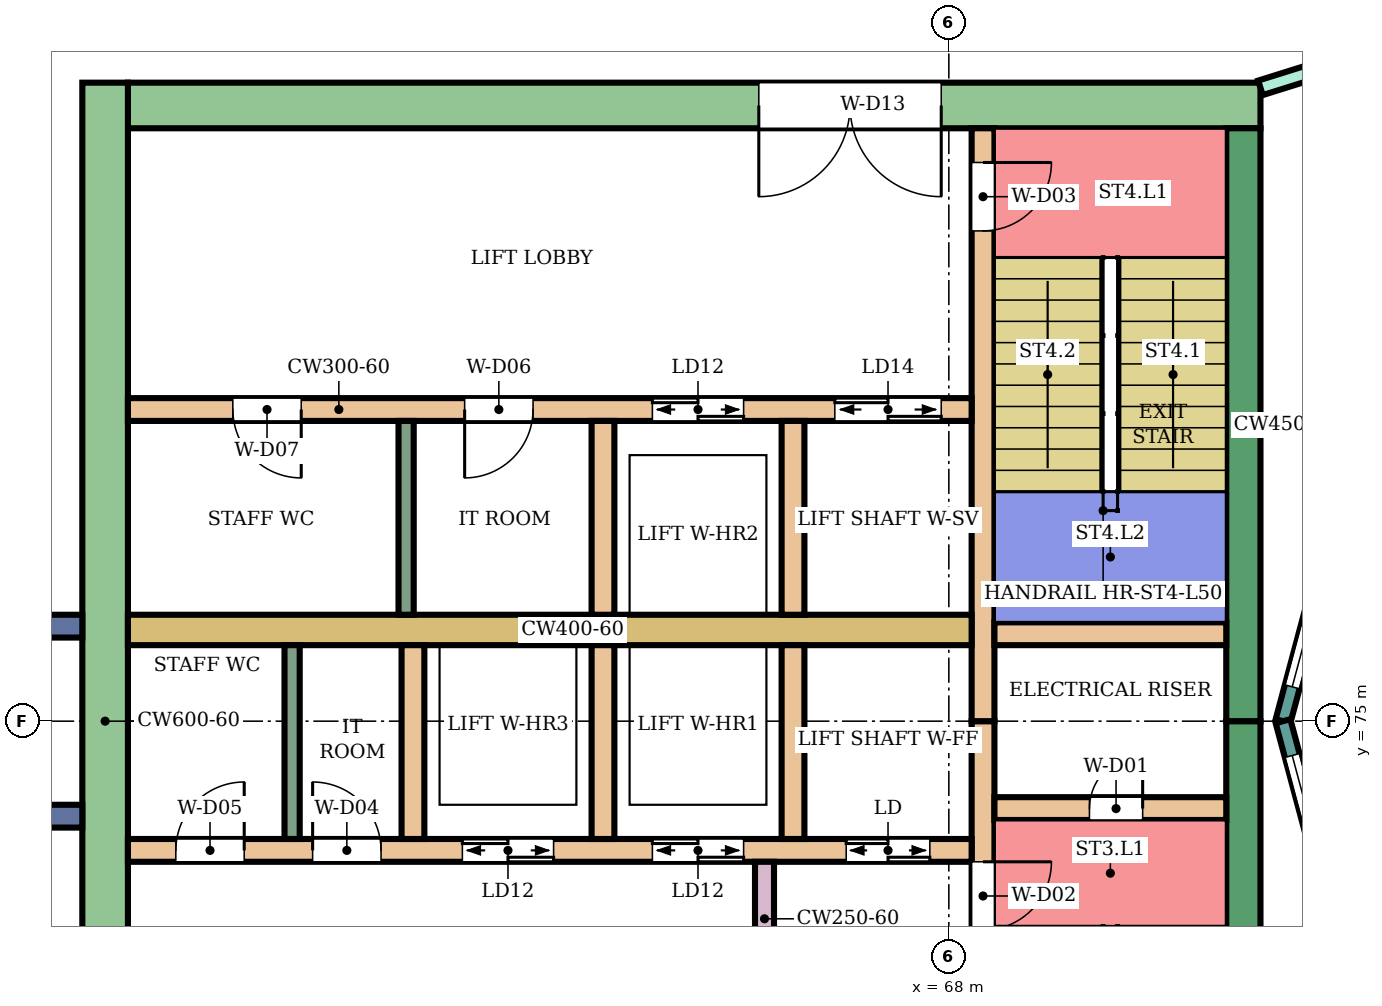
"""IFC4 building model, lengths in metres.
Left out: names, types, materials, properties, quantities, classifications, styles, units other than length and angle.
Written with IfcOpenShell. Run it as: python <this file> out.ifc"""

import sys

from ifc_helpers import new_model, si_unit, direction, frame, frame_2d, origin, place, context, subcontext, project, spatial, rectangle, extrude, element, fill, save


model = new_model("IFC4")
c1 = context("Model", 3, precision=1e-05, world=origin(), true_north=direction((0.0, 1.0)))
c2 = subcontext(c1, "Body", "Model", "MODEL_VIEW")
j1 = project(units=[si_unit("LENGTHUNIT", "METRE"), si_unit("PLANEANGLEUNIT", "RADIAN")], contexts=[c1])
p1 = place(None, origin())
s1 = spatial("IfcSite", under=j1, at=p1, CompositionType="ELEMENT")
p2 = place(p1, origin())
s2 = spatial("IfcBuilding", under=s1, at=p2, CompositionType="ELEMENT")
p3 = place(p2, frame((0.0, 0.0, 216.7)))
s3 = spatial("IfcBuildingStorey", under=s2, at=p3, CompositionType="ELEMENT", Elevation=216.7)
p4 = place(p3, frame((72.1, 83.1, 0.0), z_axis=(0.0, 0.0, 1.0), x_axis=(-1.0, 0.0, 0.0)))
e1 = element("IfcWall", 1, at=p4, inside=s3, PredefinedType="SHEAR", context=c2, shape_type="SweptSolid", body=[
    extrude(rectangle(XDim=14.9, YDim=0.6, at=frame_2d((7.45, 0.0))), origin(), (0.0, 0.0, 1.0), 3.88),
])
p5 = place(p4, frame((4.2, 0.0, 0.0)))
e2 = element("IfcOpeningElement", 2, at=p5, cuts=e1, PredefinedType="OPENING", context=c2, shape_type="SweptSolid", body=[
    extrude(rectangle(XDim=2.4, YDim=2.4, at=frame_2d((1.2, 1.2))), frame((0.0, 0.31, 0.0), z_axis=(0.0, -1.0, 0.0), x_axis=(1.0, 0.0, 0.0)), (0.0, 0.0, 1.0), 0.62),
])
for number, where, z_axis, x_axis in (
    (3, (71.875, 75.0, 0.0), (0.0, 0.0, 1.0), (0.0, -1.0, 0.0)),
    (4, (71.875, 82.8, 0.0), (0.0, 0.0, 1.0), (0.0, -1.0, 0.0)),
):
    element("IfcWall", number, at=place(p3, frame(where, z_axis=z_axis, x_axis=x_axis)), inside=s3, PredefinedType="SHEAR", context=c2, shape_type="SweptSolid", body=[
        extrude(rectangle(XDim=7.8, YDim=0.45, at=frame_2d((3.9, 0.0))), origin(), (0.0, 0.0, 1.0), 3.88),
    ])
p6 = place(p3, frame((56.9, 83.4, 0.0), z_axis=(0.0, 0.0, 1.0), x_axis=(0.0, -1.0, 0.0)))
e5 = element("IfcWall", 5, at=p6, inside=s3, PredefinedType="SHEAR", context=c2, shape_type="SweptSolid", body=[
    extrude(rectangle(XDim=16.8, YDim=0.6, at=frame_2d((8.4, 0.0))), origin(), (0.0, 0.0, 1.0), 3.88),
])
p7 = place(p3, frame((68.45, 75.0, 0.0), z_axis=(0.0, 0.0, 1.0), x_axis=(0.0, -1.0, 0.0)))
e6 = element("IfcWall", 6, at=p7, inside=s3, PredefinedType="SHEAR", context=c2, shape_type="SweptSolid", body=[
    extrude(rectangle(XDim=7.8, YDim=0.3, at=frame_2d((3.9, 0.0))), origin(), (0.0, 0.0, 1.0), 3.88),
])
p8 = place(p7, frame((1.85, 0.0, 0.0)))
e7 = element("IfcOpeningElement", 7, at=p8, cuts=e6, PredefinedType="OPENING", context=c2, shape_type="SweptSolid", body=[
    extrude(rectangle(XDim=0.9, YDim=2.1, at=frame_2d((0.45, 1.05))), frame((0.0, 0.16, 0.0), z_axis=(0.0, -1.0, 0.0), x_axis=(1.0, 0.0, 0.0)), (0.0, 0.0, 1.0), 0.32),
])
p9 = place(p3, frame((68.45, 82.8, 0.0), z_axis=(0.0, 0.0, 1.0), x_axis=(0.0, -1.0, 0.0)))
e8 = element("IfcWall", 8, at=p9, inside=s3, PredefinedType="SHEAR", context=c2, shape_type="SweptSolid", body=[
    extrude(rectangle(XDim=7.8, YDim=0.3, at=frame_2d((3.9, 0.0))), origin(), (0.0, 0.0, 1.0), 3.88),
])
p10 = place(p9, frame((0.45, 0.0, 0.0)))
e9 = element("IfcOpeningElement", 9, at=p10, cuts=e8, PredefinedType="OPENING", context=c2, shape_type="SweptSolid", body=[
    extrude(rectangle(XDim=0.9, YDim=2.1, at=frame_2d((0.45, 1.05))), frame((0.0, 0.16, 0.0), z_axis=(0.0, -1.0, 0.0), x_axis=(1.0, 0.0, 0.0)), (0.0, 0.0, 1.0), 0.32),
])
p11 = place(p3, frame((71.65, 73.85, 0.0), z_axis=(0.0, 0.0, 1.0), x_axis=(-1.0, 0.0, 0.0)))
e10 = element("IfcWall", 10, at=p11, inside=s3, PredefinedType="SHEAR", context=c2, shape_type="SweptSolid", body=[
    extrude(rectangle(XDim=3.05, YDim=0.3, at=frame_2d((1.525, 0.0))), origin(), (0.0, 0.0, 1.0), 3.88),
])
p12 = place(p11, frame((1.1, 0.0, 0.0)))
e11 = element("IfcOpeningElement", 11, at=p12, cuts=e10, PredefinedType="OPENING", context=c2, shape_type="SweptSolid", body=[
    extrude(rectangle(XDim=0.7, YDim=2.0, at=frame_2d((0.35, 1.0))), frame((0.0, 0.16, 0.0), z_axis=(0.0, -1.0, 0.0), x_axis=(1.0, 0.0, 0.0)), (0.0, 0.0, 1.0), 0.32),
])
p13 = place(p3, frame((71.65, 76.15, 0.0), z_axis=(0.0, 0.0, 1.0), x_axis=(-1.0, 0.0, 0.0)))
e12 = element("IfcWall", 12, at=p13, inside=s3, PredefinedType="SHEAR", context=c2, shape_type="SweptSolid", body=[
    extrude(rectangle(XDim=3.05, YDim=0.3, at=frame_2d((1.525, 0.0))), origin(), (0.0, 0.0, 1.0), 3.88),
])
p14 = place(p3, frame((68.3, 73.3, 0.0), z_axis=(0.0, 0.0, 1.0), x_axis=(-1.0, 0.0, 0.0)))
e13 = element("IfcWall", 13, at=p14, inside=s3, PredefinedType="SHEAR", context=c2, shape_type="SweptSolid", body=[
    extrude(rectangle(XDim=11.1, YDim=0.3, at=frame_2d((5.55, 0.0))), origin(), (0.0, 0.0, 1.0), 3.88),
])
p15 = place(p14, frame((0.55, 0.0, 0.0)))
e14 = element("IfcOpeningElement", 14, at=p15, cuts=e13, PredefinedType="OPENING", context=c2, shape_type="SweptSolid", body=[
    extrude(rectangle(XDim=1.1, YDim=2.1, at=frame_2d((0.55, 1.05))), frame((0.0, 0.16, 0.0), z_axis=(0.0, -1.0, 0.0), x_axis=(1.0, 0.0, 0.0)), (0.0, 0.0, 1.0), 0.32),
])
p16 = place(p14, frame((3.0, 0.0, 0.0)))
e15 = element("IfcOpeningElement", 15, at=p16, cuts=e13, PredefinedType="OPENING", context=c2, shape_type="SweptSolid", body=[
    extrude(rectangle(XDim=1.2, YDim=2.1, at=frame_2d((0.6, 1.05))), frame((0.0, 0.16, 0.0), z_axis=(0.0, -1.0, 0.0), x_axis=(1.0, 0.0, 0.0)), (0.0, 0.0, 1.0), 0.32),
])
p17 = place(p14, frame((5.5, 0.0, 0.0)))
e16 = element("IfcOpeningElement", 16, at=p17, cuts=e13, PredefinedType="OPENING", context=c2, shape_type="SweptSolid", body=[
    extrude(rectangle(XDim=1.2, YDim=2.1, at=frame_2d((0.6, 1.05))), frame((0.0, 0.16, 0.0), z_axis=(0.0, -1.0, 0.0), x_axis=(1.0, 0.0, 0.0)), (0.0, 0.0, 1.0), 0.32),
])
p18 = place(p14, frame((7.77, 0.0, 0.0)))
e17 = element("IfcOpeningElement", 17, at=p18, cuts=e13, PredefinedType="OPENING", context=c2, shape_type="SweptSolid", body=[
    extrude(rectangle(XDim=0.9, YDim=2.1, at=frame_2d((0.45, 1.05))), frame((0.0, 0.16, 0.0), z_axis=(0.0, -1.0, 0.0), x_axis=(1.0, 0.0, 0.0)), (0.0, 0.0, 1.0), 0.32),
])
p19 = place(p14, frame((9.57, 0.0, 0.0)))
e18 = element("IfcOpeningElement", 18, at=p19, cuts=e13, PredefinedType="OPENING", context=c2, shape_type="SweptSolid", body=[
    extrude(rectangle(XDim=0.9, YDim=2.1, at=frame_2d((0.45, 1.05))), frame((0.0, 0.16, 0.0), z_axis=(0.0, -1.0, 0.0), x_axis=(1.0, 0.0, 0.0)), (0.0, 0.0, 1.0), 0.32),
])
p20 = place(p3, frame((68.3, 76.2, 0.0), z_axis=(0.0, 0.0, 1.0), x_axis=(-1.0, 0.0, 0.0)))
e19 = element("IfcWall", 19, at=p20, inside=s3, PredefinedType="SHEAR", context=c2, shape_type="SweptSolid", body=[
    extrude(rectangle(XDim=11.1, YDim=0.4, at=frame_2d((5.55, 0.0))), origin(), (0.0, 0.0, 1.0), 3.88),
])
p21 = place(p3, frame((68.3, 79.1, 0.0), z_axis=(0.0, 0.0, 1.0), x_axis=(-1.0, 0.0, 0.0)))
e20 = element("IfcWall", 20, at=p21, inside=s3, PredefinedType="SHEAR", context=c2, shape_type="SweptSolid", body=[
    extrude(rectangle(XDim=11.1, YDim=0.3, at=frame_2d((5.55, 0.0))), origin(), (0.0, 0.0, 1.0), 3.88),
])
p22 = place(p21, frame((0.4, 0.0, 0.0)))
e21 = element("IfcOpeningElement", 21, at=p22, cuts=e20, PredefinedType="OPENING", context=c2, shape_type="SweptSolid", body=[
    extrude(rectangle(XDim=1.4, YDim=2.1, at=frame_2d((0.7, 1.05))), frame((0.0, 0.16, 0.0), z_axis=(0.0, -1.0, 0.0), x_axis=(1.0, 0.0, 0.0)), (0.0, 0.0, 1.0), 0.32),
])
p23 = place(p21, frame((3.0, 0.0, 0.0)))
e22 = element("IfcOpeningElement", 22, at=p23, cuts=e20, PredefinedType="OPENING", context=c2, shape_type="SweptSolid", body=[
    extrude(rectangle(XDim=1.2, YDim=2.1, at=frame_2d((0.6, 1.05))), frame((0.0, 0.16, 0.0), z_axis=(0.0, -1.0, 0.0), x_axis=(1.0, 0.0, 0.0)), (0.0, 0.0, 1.0), 0.32),
])
p24 = place(p21, frame((5.77, 0.0, 0.0)))
e23 = element("IfcOpeningElement", 23, at=p24, cuts=e20, PredefinedType="OPENING", context=c2, shape_type="SweptSolid", body=[
    extrude(rectangle(XDim=0.9, YDim=2.1, at=frame_2d((0.45, 1.05))), frame((0.0, 0.16, 0.0), z_axis=(0.0, -1.0, 0.0), x_axis=(1.0, 0.0, 0.0)), (0.0, 0.0, 1.0), 0.32),
])
p25 = place(p21, frame((8.82, 0.0, 0.0)))
e24 = element("IfcOpeningElement", 24, at=p25, cuts=e20, PredefinedType="OPENING", context=c2, shape_type="SweptSolid", body=[
    extrude(rectangle(XDim=0.9, YDim=2.1, at=frame_2d((0.45, 1.05))), frame((0.0, 0.16, 0.0), z_axis=(0.0, -1.0, 0.0), x_axis=(1.0, 0.0, 0.0)), (0.0, 0.0, 1.0), 0.32),
])
for number, where, z_axis, x_axis in (
    (25, (65.95, 76.0, 0.0), (0.0, 0.0, 1.0), (0.0, -1.0, 0.0)),
    (26, (63.45, 76.0, 0.0), (0.0, 0.0, 1.0), (0.0, -1.0, 0.0)),
    (27, (60.95, 76.0, 0.0), (0.0, 0.0, 1.0), (0.0, -1.0, 0.0)),
    (28, (65.95, 78.95, 0.0), (0.0, 0.0, 1.0), (0.0, -1.0, 0.0)),
    (29, (63.45, 78.95, 0.0), (0.0, 0.0, 1.0), (0.0, -1.0, 0.0)),
):
    element("IfcWall", number, at=place(p3, frame(where, z_axis=z_axis, x_axis=x_axis)), inside=s3, PredefinedType="SHEAR", context=c2, shape_type="SweptSolid", body=[
        extrude(rectangle(XDim=2.55, YDim=0.3, at=frame_2d((1.275, 0.0))), origin(), (0.0, 0.0, 1.0), 3.88),
    ])
p26 = place(p3, frame((65.575, 73.15, 0.0), z_axis=(0.0, 0.0, 1.0), x_axis=(0.0, -1.0, 0.0)))
e30 = element("IfcWall", 30, at=p26, inside=s3, PredefinedType="SHEAR", context=c2, shape_type="SweptSolid", body=[
    extrude(rectangle(XDim=1.5, YDim=0.25, at=frame_2d((0.75, 0.0))), origin(), (0.0, 0.0, 1.0), 3.88),
])
for number, where, z_axis, x_axis in (
    (31, (56.6, 76.25, 0.0), (0.0, 0.0, 1.0), (-1.0, 0.0, 0.0)),
    (32, (56.6, 73.75, 0.0), (0.0, 0.0, 1.0), (-1.0, 0.0, 0.0)),
):
    element("IfcWall", number, at=place(p3, frame(where, z_axis=z_axis, x_axis=x_axis)), inside=s3, PredefinedType="NOTDEFINED", context=c2, shape_type="SweptSolid", body=[
        extrude(rectangle(XDim=2.416, YDim=0.3, at=frame_2d((1.208, 0.0))), origin(), (0.0, 0.0, 1.0), 4.2),
    ])
p27 = place(p3, frame((73.415, 78.802, 0.0), z_axis=(0.0, 0.0, 1.0), x_axis=(-0.258789828301, -0.965933654434, 0.0)))
e33 = element("IfcWall", 33, at=p27, inside=s3, PredefinedType="NOTDEFINED", context=c2, shape_type="SweptSolid", body=[
    extrude(rectangle(XDim=3.936, YDim=0.2, at=frame_2d((1.968, 0.0))), origin(), (0.0, 0.0, 1.0), 4.2),
])
p28 = place(p27, frame((0.468, 0.0, 0.9)))
e34 = element("IfcOpeningElement", 34, at=p28, cuts=e33, PredefinedType="OPENING", context=c2, shape_type="SweptSolid", body=[
    extrude(rectangle(XDim=3.0, YDim=2.3, at=frame_2d((1.5, 1.15))), frame((0.0, 0.11, 0.0), z_axis=(0.0, -1.0, 0.0), x_axis=(1.0, 0.0, 0.0)), (0.0, 0.0, 1.0), 0.22),
])
p29 = place(p3, frame((72.396, 75.0, 0.0), z_axis=(0.0, 0.0, 1.0), x_axis=(0.258789828301, -0.965933654434, 0.0)))
e35 = element("IfcWall", 35, at=p29, inside=s3, PredefinedType="NOTDEFINED", context=c2, shape_type="SweptSolid", body=[
    extrude(rectangle(XDim=3.936, YDim=0.2, at=frame_2d((1.968, 0.0))), origin(), (0.0, 0.0, 1.0), 4.2),
])
p30 = place(p29, frame((0.468, 0.0, 0.9)))
e36 = element("IfcOpeningElement", 36, at=p30, cuts=e35, PredefinedType="OPENING", context=c2, shape_type="SweptSolid", body=[
    extrude(rectangle(XDim=3.0, YDim=2.3, at=frame_2d((1.5, 1.15))), frame((0.0, 0.11, 0.0), z_axis=(0.0, -1.0, 0.0), x_axis=(1.0, 0.0, 0.0)), (0.0, 0.0, 1.0), 0.22),
])
p31 = place(p3, frame((72.1, 83.332, 0.0), z_axis=(0.0, 0.0, 1.0), x_axis=(0.954233106619, 0.299063836383, 0.0)))
e37 = element("IfcWall", 37, at=p31, inside=s3, PredefinedType="PARTITIONING", context=c2, shape_type="SweptSolid", body=[
    extrude(rectangle(XDim=2.414, YDim=0.2, at=frame_2d((1.207, 0.0))), origin(), (0.0, 0.0, 1.0), 3.75),
])
p32 = place(p31, frame((0.762, 0.0, 0.0)))
e38 = element("IfcOpeningElement", 38, at=p32, cuts=e37, PredefinedType="OPENING", context=c2, shape_type="SweptSolid", body=[
    extrude(rectangle(XDim=0.9, YDim=2.1, at=frame_2d((0.45, 1.05))), frame((0.0, 0.11, 0.0), z_axis=(0.0, -1.0, 0.0), x_axis=(1.0, 0.0, 0.0)), (0.0, 0.0, 1.0), 0.22),
])
for number, where, z_axis, x_axis in (
    (39, (59.36, 76.0, 0.0), (0.0, 0.0, 1.0), (0.0, -1.0, 0.0)),
    (40, (60.86, 78.95, 0.0), (0.0, 0.0, 1.0), (0.0, -1.0, 0.0)),
):
    element("IfcWall", number, at=place(p3, frame(where, z_axis=z_axis, x_axis=x_axis)), inside=s3, PredefinedType="PARTITIONING", context=c2, shape_type="SweptSolid", body=[
        extrude(rectangle(XDim=2.55, YDim=0.2, at=frame_2d((1.275, 0.0))), origin(), (0.0, 0.0, 1.0), 3.88),
    ])
p33 = place(p28, origin())
e41 = element("IfcWindow", 41, at=p33, inside=s3, PartitioningType="SINGLE_PANEL", PredefinedType="WINDOW", context=c2, shape_type="SweptSolid", body=[
    extrude(rectangle(XDim=3.0, YDim=2.3, at=frame_2d((1.5, 1.15))), frame((0.0, 0.03, 0.0), z_axis=(0.0, -1.0, 0.0), x_axis=(1.0, 0.0, 0.0)), (0.0, 0.0, 1.0), 0.06),
])
fill(e34, e41)
p34 = place(p30, origin())
e42 = element("IfcWindow", 42, at=p34, inside=s3, PartitioningType="SINGLE_PANEL", PredefinedType="WINDOW", context=c2, shape_type="SweptSolid", body=[
    extrude(rectangle(XDim=3.0, YDim=2.3, at=frame_2d((1.5, 1.15))), frame((0.0, 0.03, 0.0), z_axis=(0.0, -1.0, 0.0), x_axis=(1.0, 0.0, 0.0)), (0.0, 0.0, 1.0), 0.06),
])
fill(e36, e42)
p35 = place(p12, frame((0.7, 0.0, 0.0), z_axis=(0.0, 0.0, 1.0), x_axis=(-1.0, 0.0, 0.0)))
e43 = element("IfcDoor", 43, at=p35, inside=s3, OperationType="SINGLE_SWING_RIGHT", PredefinedType="DOOR", context=c2, shape_type="SweptSolid", body=[
    extrude(rectangle(XDim=0.7, YDim=2.0, at=frame_2d((0.35, 1.0))), frame((0.0, 0.025, 0.0), z_axis=(0.0, -1.0, 0.0), x_axis=(1.0, 0.0, 0.0)), (0.0, 0.0, 1.0), 0.05),
])
fill(e11, e43)
p36 = place(p8, origin())
e44 = element("IfcDoor", 44, at=p36, inside=s3, OperationType="SINGLE_SWING_LEFT", PredefinedType="DOOR", context=c2, shape_type="SweptSolid", body=[
    extrude(rectangle(XDim=0.9, YDim=2.1, at=frame_2d((0.45, 1.05))), frame((0.0, 0.025, 0.0), z_axis=(0.0, -1.0, 0.0), x_axis=(1.0, 0.0, 0.0)), (0.0, 0.0, 1.0), 0.05),
])
fill(e7, e44)
p37 = place(p10, origin())
e45 = element("IfcDoor", 45, at=p37, inside=s3, OperationType="SINGLE_SWING_LEFT", PredefinedType="DOOR", context=c2, shape_type="SweptSolid", body=[
    extrude(rectangle(XDim=0.9, YDim=2.1, at=frame_2d((0.45, 1.05))), frame((0.0, 0.025, 0.0), z_axis=(0.0, -1.0, 0.0), x_axis=(1.0, 0.0, 0.0)), (0.0, 0.0, 1.0), 0.05),
])
fill(e9, e45)
p38 = place(p15, origin())
e46 = element("IfcDoor", 46, at=p38, inside=s3, OperationType="DOUBLE_DOOR_SLIDING", PredefinedType="DOOR", context=c2, shape_type="SweptSolid", body=[
    extrude(rectangle(XDim=1.1, YDim=2.1, at=frame_2d((0.55, 1.05))), frame((0.0, 0.025, 0.0), z_axis=(0.0, -1.0, 0.0), x_axis=(1.0, 0.0, 0.0)), (0.0, 0.0, 1.0), 0.05),
])
fill(e14, e46)
p39 = place(p16, origin())
e47 = element("IfcDoor", 47, at=p39, inside=s3, OperationType="DOUBLE_DOOR_SLIDING", PredefinedType="DOOR", context=c2, shape_type="SweptSolid", body=[
    extrude(rectangle(XDim=1.2, YDim=2.1, at=frame_2d((0.6, 1.05))), frame((0.0, 0.025, 0.0), z_axis=(0.0, -1.0, 0.0), x_axis=(1.0, 0.0, 0.0)), (0.0, 0.0, 1.0), 0.05),
])
fill(e15, e47)
p40 = place(p17, origin())
e48 = element("IfcDoor", 48, at=p40, inside=s3, OperationType="DOUBLE_DOOR_SLIDING", PredefinedType="DOOR", context=c2, shape_type="SweptSolid", body=[
    extrude(rectangle(XDim=1.2, YDim=2.1, at=frame_2d((0.6, 1.05))), frame((0.0, 0.025, 0.0), z_axis=(0.0, -1.0, 0.0), x_axis=(1.0, 0.0, 0.0)), (0.0, 0.0, 1.0), 0.05),
])
fill(e16, e48)
p41 = place(p18, frame((0.9, 0.0, 0.0), z_axis=(0.0, 0.0, 1.0), x_axis=(-1.0, 0.0, 0.0)))
e49 = element("IfcDoor", 49, at=p41, inside=s3, OperationType="SINGLE_SWING_LEFT", PredefinedType="DOOR", context=c2, shape_type="SweptSolid", body=[
    extrude(rectangle(XDim=0.9, YDim=2.1, at=frame_2d((0.45, 1.05))), frame((0.0, 0.025, 0.0), z_axis=(0.0, -1.0, 0.0), x_axis=(1.0, 0.0, 0.0)), (0.0, 0.0, 1.0), 0.05),
])
fill(e17, e49)
p42 = place(p19, frame((0.9, 0.0, 0.0), z_axis=(0.0, 0.0, 1.0), x_axis=(-1.0, 0.0, 0.0)))
e50 = element("IfcDoor", 50, at=p42, inside=s3, OperationType="SINGLE_SWING_RIGHT", PredefinedType="DOOR", context=c2, shape_type="SweptSolid", body=[
    extrude(rectangle(XDim=0.9, YDim=2.1, at=frame_2d((0.45, 1.05))), frame((0.0, 0.025, 0.0), z_axis=(0.0, -1.0, 0.0), x_axis=(1.0, 0.0, 0.0)), (0.0, 0.0, 1.0), 0.05),
])
fill(e18, e50)
p43 = place(p22, origin())
e51 = element("IfcDoor", 51, at=p43, inside=s3, OperationType="DOUBLE_DOOR_SLIDING", PredefinedType="DOOR", context=c2, shape_type="SweptSolid", body=[
    extrude(rectangle(XDim=1.4, YDim=2.1, at=frame_2d((0.7, 1.05))), frame((0.0, 0.025, 0.0), z_axis=(0.0, -1.0, 0.0), x_axis=(1.0, 0.0, 0.0)), (0.0, 0.0, 1.0), 0.05),
])
fill(e21, e51)
p44 = place(p23, origin())
e52 = element("IfcDoor", 52, at=p44, inside=s3, OperationType="DOUBLE_DOOR_SLIDING", PredefinedType="DOOR", context=c2, shape_type="SweptSolid", body=[
    extrude(rectangle(XDim=1.2, YDim=2.1, at=frame_2d((0.6, 1.05))), frame((0.0, 0.025, 0.0), z_axis=(0.0, -1.0, 0.0), x_axis=(1.0, 0.0, 0.0)), (0.0, 0.0, 1.0), 0.05),
])
fill(e22, e52)
p45 = place(p24, origin())
e53 = element("IfcDoor", 53, at=p45, inside=s3, OperationType="SINGLE_SWING_RIGHT", PredefinedType="DOOR", context=c2, shape_type="SweptSolid", body=[
    extrude(rectangle(XDim=0.9, YDim=2.1, at=frame_2d((0.45, 1.05))), frame((0.0, 0.025, 0.0), z_axis=(0.0, -1.0, 0.0), x_axis=(1.0, 0.0, 0.0)), (0.0, 0.0, 1.0), 0.05),
])
fill(e23, e53)
p46 = place(p25, origin())
e54 = element("IfcDoor", 54, at=p46, inside=s3, OperationType="SINGLE_SWING_LEFT", PredefinedType="DOOR", context=c2, shape_type="SweptSolid", body=[
    extrude(rectangle(XDim=0.9, YDim=2.1, at=frame_2d((0.45, 1.05))), frame((0.0, 0.025, 0.0), z_axis=(0.0, -1.0, 0.0), x_axis=(1.0, 0.0, 0.0)), (0.0, 0.0, 1.0), 0.05),
])
fill(e24, e54)
p47 = place(p5, origin())
e55 = element("IfcDoor", 55, at=p47, inside=s3, OperationType="DOUBLE_DOOR_SINGLE_SWING", PredefinedType="DOOR", context=c2, shape_type="SweptSolid", body=[
    extrude(rectangle(XDim=2.4, YDim=2.4, at=frame_2d((1.2, 1.2))), frame((0.0, 0.025, 0.0), z_axis=(0.0, -1.0, 0.0), x_axis=(1.0, 0.0, 0.0)), (0.0, 0.0, 1.0), 0.05),
])
fill(e2, e55)
save(model, sys.argv[1])
